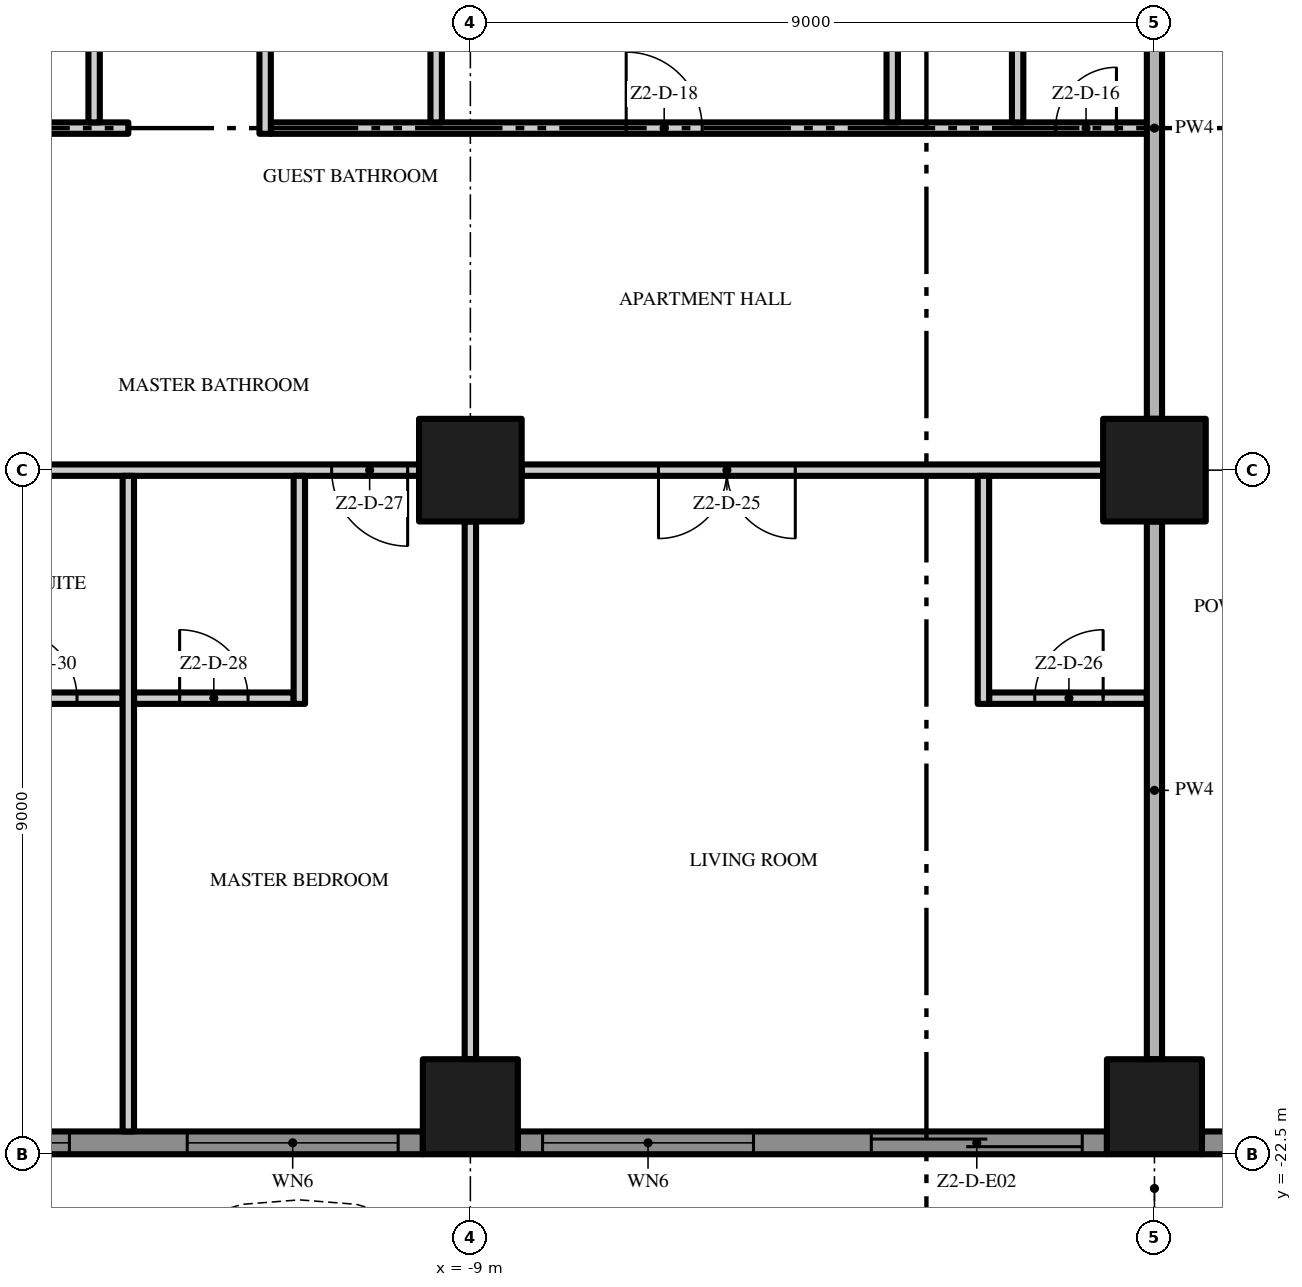
"""IFC4 building model, lengths in metres.
Left out: names, types, materials, properties, quantities, classifications, styles, units other than length and angle.
Written with IfcOpenShell. Run it as: python <this file> out.ifc"""

import sys

from ifc_helpers import new_model, si_unit, direction, frame, frame_2d, origin, origin_2d, place, context, subcontext, project, spatial, polyline, rectangle, outline, extrude, element, fill, save


model = new_model("IFC4")
c1 = context("Model", 3, precision=1e-05, world=origin(), true_north=direction((0.0, 1.0)))
c2 = subcontext(c1, "Body", "Model", "MODEL_VIEW")
j1 = project(units=[si_unit("LENGTHUNIT", "METRE"), si_unit("PLANEANGLEUNIT", "RADIAN")], contexts=[c1])
p1 = place(None, origin())
s1 = spatial("IfcSite", under=j1, at=p1, CompositionType="ELEMENT")
p2 = place(p1, origin())
s2 = spatial("IfcBuilding", under=s1, at=p2, CompositionType="ELEMENT")
p3 = place(p2, frame((0.0, 0.0, 107.4)))
s3 = spatial("IfcBuildingStorey", under=s2, at=p3, CompositionType="ELEMENT", Elevation=107.4)
p4 = place(p3, frame((-9.0, -13.5, 0.0), z_axis=(0.0, 0.0, 1.0), x_axis=(1.0, 0.0, 0.0)))
e1 = element("IfcColumn", 1, at=p4, inside=s3, PredefinedType="COLUMN", context=c2, shape_type="SweptSolid", body=[
    extrude(rectangle(XDim=1.35, YDim=1.35, at=origin_2d()), origin(), (0.0, 0.0, 1.0), 3.5),
])
p5 = place(p3, frame((-9.0, -21.875, 0.0), z_axis=(0.0, 0.0, 1.0), x_axis=(1.0, 0.0, 0.0)))
e2 = element("IfcColumn", 2, at=p5, inside=s3, PredefinedType="COLUMN", context=c2, shape_type="SweptSolid", body=[
    extrude(rectangle(XDim=1.25, YDim=1.25, at=origin_2d()), origin(), (0.0, 0.0, 1.0), 3.5),
])
p6 = place(p3, frame((0.0, -13.5, 0.0), z_axis=(0.0, 0.0, 1.0), x_axis=(1.0, 0.0, 0.0)))
e3 = element("IfcColumn", 3, at=p6, inside=s3, PredefinedType="COLUMN", context=c2, shape_type="SweptSolid", body=[
    extrude(rectangle(XDim=1.35, YDim=1.35, at=origin_2d()), origin(), (0.0, 0.0, 1.0), 3.5),
])
p7 = place(p3, frame((0.0, -21.875, 0.0), z_axis=(0.0, 0.0, 1.0), x_axis=(1.0, 0.0, 0.0)))
e4 = element("IfcColumn", 4, at=p7, inside=s3, PredefinedType="COLUMN", context=c2, shape_type="SweptSolid", body=[
    extrude(rectangle(XDim=1.25, YDim=1.25, at=origin_2d()), origin(), (0.0, 0.0, 1.0), 3.5),
])
p8 = place(p3, frame((-9.625, -22.35, 0.0), z_axis=(0.0, 0.0, 1.0), x_axis=(-1.0, 0.0, 0.0)))
e5 = element("IfcWall", 5, at=p8, inside=s3, PredefinedType="SOLIDWALL", context=c2, shape_type="SweptSolid", body=[
    extrude(rectangle(XDim=7.75, YDim=0.3, at=frame_2d((3.875, 0.0))), origin(), (0.0, 0.0, 1.0), 3.5),
])
p9 = place(p8, frame((4.65, 0.0, 0.45)))
e6 = element("IfcOpeningElement", 6, at=p9, cuts=e5, PredefinedType="OPENING", context=c2, shape_type="SweptSolid", body=[
    extrude(rectangle(XDim=2.775, YDim=2.65, at=frame_2d((1.387, 1.325))), frame((0.0, 0.16, 0.0), z_axis=(0.0, -1.0, 0.0), x_axis=(1.0, 0.0, 0.0)), (0.0, 0.0, 1.0), 0.32),
])
p10 = place(p8, frame((0.325, 0.0, 0.45)))
e7 = element("IfcOpeningElement", 7, at=p10, cuts=e5, PredefinedType="OPENING", context=c2, shape_type="SweptSolid", body=[
    extrude(rectangle(XDim=2.775, YDim=2.65, at=frame_2d((1.387, 1.325))), frame((0.0, 0.16, 0.0), z_axis=(0.0, -1.0, 0.0), x_axis=(1.0, 0.0, 0.0)), (0.0, 0.0, 1.0), 0.32),
])
p11 = place(p3, frame((-0.625, -22.35, 0.0), z_axis=(0.0, 0.0, 1.0), x_axis=(-1.0, 0.0, 0.0)))
e8 = element("IfcWall", 8, at=p11, inside=s3, PredefinedType="SOLIDWALL", context=c2, shape_type="SweptSolid", body=[
    extrude(rectangle(XDim=7.75, YDim=0.3, at=frame_2d((3.875, 0.0))), origin(), (0.0, 0.0, 1.0), 3.5),
])
p12 = place(p11, frame((4.65, 0.0, 0.45)))
e9 = element("IfcOpeningElement", 9, at=p12, cuts=e8, PredefinedType="OPENING", context=c2, shape_type="SweptSolid", body=[
    extrude(rectangle(XDim=2.775, YDim=2.65, at=frame_2d((1.387, 1.325))), frame((0.0, 0.16, 0.0), z_axis=(0.0, -1.0, 0.0), x_axis=(1.0, 0.0, 0.0)), (0.0, 0.0, 1.0), 0.32),
])
p13 = place(p11, frame((0.325, 0.0, 0.0)))
e10 = element("IfcOpeningElement", 10, at=p13, cuts=e8, PredefinedType="OPENING", context=c2, shape_type="SweptSolid", body=[
    extrude(rectangle(XDim=2.775, YDim=2.4, at=frame_2d((1.387, 1.2))), frame((0.0, 0.16, 0.0), z_axis=(0.0, -1.0, 0.0), x_axis=(1.0, 0.0, 0.0)), (0.0, 0.0, 1.0), 0.32),
])
p14 = place(p3, frame((8.375, -22.35, 0.0), z_axis=(0.0, 0.0, 1.0), x_axis=(-1.0, 0.0, 0.0)))
e11 = element("IfcWall", 11, at=p14, inside=s3, PredefinedType="SOLIDWALL", context=c2, shape_type="SweptSolid", body=[
    extrude(rectangle(XDim=7.75, YDim=0.3, at=frame_2d((3.875, 0.0))), origin(), (0.0, 0.0, 1.0), 3.5),
])
p15 = place(p14, frame((4.65, 0.0, 0.45)))
e12 = element("IfcOpeningElement", 12, at=p15, cuts=e11, PredefinedType="OPENING", context=c2, shape_type="SweptSolid", body=[
    extrude(rectangle(XDim=2.775, YDim=2.65, at=frame_2d((1.387, 1.325))), frame((0.0, 0.16, 0.0), z_axis=(0.0, -1.0, 0.0), x_axis=(1.0, 0.0, 0.0)), (0.0, 0.0, 1.0), 0.32),
])
p16 = place(p14, frame((0.325, 0.0, 0.45)))
e13 = element("IfcOpeningElement", 13, at=p16, cuts=e11, PredefinedType="OPENING", context=c2, shape_type="SweptSolid", body=[
    extrude(rectangle(XDim=2.775, YDim=2.65, at=frame_2d((1.387, 1.325))), frame((0.0, 0.16, 0.0), z_axis=(0.0, -1.0, 0.0), x_axis=(1.0, 0.0, 0.0)), (0.0, 0.0, 1.0), 0.32),
])
p17 = place(p3, origin())
e14 = element("IfcWall", 14, at=p17, inside=s3, PredefinedType="USERDEFINED", context=c2, shape_type="SweptSolid", body=[
    extrude(outline(polyline([(-22.5, -24.3), (-21.0, -25.005), (-19.5, -25.441), (-18.75, -25.5), (-18.0, -25.441), (-16.5, -25.005), (-15.0, -24.3), (-13.5, -23.595), (-12.0, -23.159), (-11.25, -23.1), (-10.5, -23.159), (-9.0, -23.595), (-7.5, -24.3), (-6.0, -25.005), (-4.5, -25.441), (-3.75, -25.5), (-3.0, -25.441), (-1.5, -25.005), (0.0, -24.3), (1.5, -23.595), (3.0, -23.159), (3.75, -23.1), (4.5, -23.159), (6.0, -23.595), (7.5, -24.3), (9.0, -25.005), (10.5, -25.441), (11.25, -25.5), (12.0, -25.441), (13.5, -25.005), (15.0, -24.3), (16.5, -23.595), (18.0, -23.159), (18.75, -23.1), (19.5, -23.159), (21.0, -23.595), (22.5, -24.3), (22.606, -24.074), (21.089, -23.36), (19.545, -22.911), (18.75, -22.849), (17.955, -22.911), (16.411, -23.36), (14.894, -24.074), (13.411, -24.771), (11.955, -25.194), (11.25, -25.249), (10.545, -25.194), (9.089, -24.771), (7.606, -24.074), (6.089, -23.36), (4.545, -22.911), (3.75, -22.849), (2.955, -22.911), (1.411, -23.36), (-0.106, -24.074), (-1.589, -24.771), (-3.045, -25.194), (-3.75, -25.249), (-4.455, -25.194), (-5.911, -24.771), (-7.394, -24.074), (-8.911, -23.36), (-10.455, -22.911), (-11.25, -22.849), (-12.045, -22.911), (-13.589, -23.36), (-15.106, -24.074), (-16.589, -24.771), (-18.045, -25.194), (-18.75, -25.249), (-19.455, -25.194), (-20.911, -24.771), (-22.394, -24.074), (-22.5, -24.3)])), origin(), (0.0, 0.0, 1.0), 0.9),
])
p18 = place(p3, frame((-15.675, -16.5, 0.0), z_axis=(0.0, 0.0, 1.0), x_axis=(1.0, 0.0, 0.0)))
e15 = element("IfcWall", 15, at=p18, inside=s3, PredefinedType="PARTITIONING", context=c2, shape_type="SweptSolid", body=[
    extrude(rectangle(XDim=2.1, YDim=0.15, at=frame_2d((1.05, 0.0))), origin(), (0.0, 0.0, 1.0), 3.5),
])
p19 = place(p18, frame((0.6, 0.0, 0.0)))
e16 = element("IfcOpeningElement", 16, at=p19, cuts=e15, PredefinedType="OPENING", context=c2, shape_type="SweptSolid", body=[
    extrude(rectangle(XDim=0.9, YDim=2.1, at=frame_2d((0.45, 1.05))), frame((0.0, 0.085, 0.0), z_axis=(0.0, -1.0, 0.0), x_axis=(1.0, 0.0, 0.0)), (0.0, 0.0, 1.0), 0.17),
])
p20 = place(p3, frame((-13.425, -16.5, 0.0), z_axis=(0.0, 0.0, 1.0), x_axis=(1.0, 0.0, 0.0)))
e17 = element("IfcWall", 17, at=p20, inside=s3, PredefinedType="PARTITIONING", context=c2, shape_type="SweptSolid", body=[
    extrude(rectangle(XDim=2.1, YDim=0.15, at=frame_2d((1.05, 0.0))), origin(), (0.0, 0.0, 1.0), 3.5),
])
p21 = place(p20, frame((0.6, 0.0, 0.0)))
e18 = element("IfcOpeningElement", 18, at=p21, cuts=e17, PredefinedType="OPENING", context=c2, shape_type="SweptSolid", body=[
    extrude(rectangle(XDim=0.9, YDim=2.1, at=frame_2d((0.45, 1.05))), frame((0.0, 0.085, 0.0), z_axis=(0.0, -1.0, 0.0), x_axis=(1.0, 0.0, 0.0)), (0.0, 0.0, 1.0), 0.17),
])
p22 = place(p3, frame((-2.175, -16.5, 0.0), z_axis=(0.0, 0.0, 1.0), x_axis=(1.0, 0.0, 0.0)))
e19 = element("IfcWall", 19, at=p22, inside=s3, PredefinedType="PARTITIONING", context=c2, shape_type="SweptSolid", body=[
    extrude(rectangle(XDim=2.075, YDim=0.15, at=frame_2d((1.038, 0.0))), origin(), (0.0, 0.0, 1.0), 3.5),
])
p23 = place(p22, frame((0.6, 0.0, 0.0)))
e20 = element("IfcOpeningElement", 20, at=p23, cuts=e19, PredefinedType="OPENING", context=c2, shape_type="SweptSolid", body=[
    extrude(rectangle(XDim=0.9, YDim=2.1, at=frame_2d((0.45, 1.05))), frame((0.0, 0.085, 0.0), z_axis=(0.0, -1.0, 0.0), x_axis=(1.0, 0.0, 0.0)), (0.0, 0.0, 1.0), 0.17),
])
p24 = place(p3, frame((-9.675, -13.5, 0.0), z_axis=(0.0, 0.0, 1.0), x_axis=(-1.0, 0.0, 0.0)))
e21 = element("IfcWall", 21, at=p24, inside=s3, PredefinedType="PARTITIONING", context=c2, shape_type="SweptSolid", body=[
    extrude(rectangle(XDim=7.65, YDim=0.15, at=frame_2d((3.825, 0.0))), origin(), (0.0, 0.0, 1.0), 3.5),
])
p25 = place(p24, frame((0.15, 0.0, 0.0)))
e22 = element("IfcOpeningElement", 22, at=p25, cuts=e21, PredefinedType="OPENING", context=c2, shape_type="SweptSolid", body=[
    extrude(rectangle(XDim=1.0, YDim=2.4, at=frame_2d((0.5, 1.2))), frame((0.0, 0.085, 0.0), z_axis=(0.0, -1.0, 0.0), x_axis=(1.0, 0.0, 0.0)), (0.0, 0.0, 1.0), 0.17),
])
p26 = place(p24, frame((6.5, 0.0, 0.0)))
e23 = element("IfcOpeningElement", 23, at=p26, cuts=e21, PredefinedType="OPENING", context=c2, shape_type="SweptSolid", body=[
    extrude(rectangle(XDim=1.0, YDim=2.4, at=frame_2d((0.5, 1.2))), frame((0.0, 0.085, 0.0), z_axis=(0.0, -1.0, 0.0), x_axis=(1.0, 0.0, 0.0)), (0.0, 0.0, 1.0), 0.17),
])
p27 = place(p3, frame((-0.675, -13.5, 0.0), z_axis=(0.0, 0.0, 1.0), x_axis=(-1.0, 0.0, 0.0)))
e24 = element("IfcWall", 24, at=p27, inside=s3, PredefinedType="PARTITIONING", context=c2, shape_type="SweptSolid", body=[
    extrude(rectangle(XDim=7.65, YDim=0.15, at=frame_2d((3.825, 0.0))), origin(), (0.0, 0.0, 1.0), 3.5),
])
p28 = place(p27, frame((4.05, 0.0, 0.0)))
e25 = element("IfcOpeningElement", 25, at=p28, cuts=e24, PredefinedType="OPENING", context=c2, shape_type="SweptSolid", body=[
    extrude(rectangle(XDim=1.8, YDim=2.4, at=frame_2d((0.9, 1.2))), frame((0.0, 0.085, 0.0), z_axis=(0.0, -1.0, 0.0), x_axis=(1.0, 0.0, 0.0)), (0.0, 0.0, 1.0), 0.17),
])
p29 = place(p3, frame((-26.7, -9.0, 0.0), z_axis=(0.0, 0.0, 1.0), x_axis=(1.0, 0.0, 0.0)))
e26 = element("IfcWall", 26, at=p29, inside=s3, PredefinedType="PARTITIONING", context=c2, shape_type="SweptSolid", body=[
    extrude(rectangle(XDim=13.2, YDim=0.15, at=frame_2d((6.6, 0.0))), origin(), (0.0, 0.0, 1.0), 3.5),
])
p30 = place(p29, frame((8.3, 0.0, 0.0)))
e27 = element("IfcOpeningElement", 27, at=p30, cuts=e26, PredefinedType="OPENING", context=c2, shape_type="SweptSolid", body=[
    extrude(rectangle(XDim=0.8, YDim=2.0, at=frame_2d((0.4, 1.0))), frame((0.0, 0.085, 0.0), z_axis=(0.0, -1.0, 0.0), x_axis=(1.0, 0.0, 0.0)), (0.0, 0.0, 1.0), 0.17),
])
p31 = place(p3, frame((-11.625, -9.0, 0.0), z_axis=(0.0, 0.0, 1.0), x_axis=(1.0, 0.0, 0.0)))
e28 = element("IfcWall", 28, at=p31, inside=s3, PredefinedType="PARTITIONING", context=c2, shape_type="SweptSolid", body=[
    extrude(rectangle(XDim=11.525, YDim=0.15, at=frame_2d((5.763, 0.0))), origin(), (0.0, 0.0, 1.0), 3.5),
])
p32 = place(p31, frame((10.325, 0.0, 0.0)))
e29 = element("IfcOpeningElement", 29, at=p32, cuts=e28, PredefinedType="OPENING", context=c2, shape_type="SweptSolid", body=[
    extrude(rectangle(XDim=0.8, YDim=2.0, at=frame_2d((0.4, 1.0))), frame((0.0, 0.085, 0.0), z_axis=(0.0, -1.0, 0.0), x_axis=(1.0, 0.0, 0.0)), (0.0, 0.0, 1.0), 0.17),
])
p33 = place(p31, frame((4.675, 0.0, 0.0)))
e30 = element("IfcOpeningElement", 30, at=p33, cuts=e28, PredefinedType="OPENING", context=c2, shape_type="SweptSolid", body=[
    extrude(rectangle(XDim=1.0, YDim=2.4, at=frame_2d((0.5, 1.2))), frame((0.0, 0.085, 0.0), z_axis=(0.0, -1.0, 0.0), x_axis=(1.0, 0.0, 0.0)), (0.0, 0.0, 1.0), 0.17),
])
p34 = place(p3, frame((-13.95, -8.925, 0.0), z_axis=(0.0, 0.0, 1.0), x_axis=(0.0, 1.0, 0.0)))
e31 = element("IfcWall", 31, at=p34, inside=s3, PredefinedType="PARTITIONING", context=c2, shape_type="SweptSolid", body=[
    extrude(rectangle(XDim=4.5, YDim=0.15, at=frame_2d((2.25, 0.0))), origin(), (0.0, 0.0, 1.0), 3.5),
])
p35 = place(p3, frame((-13.5, -22.2, 0.0), z_axis=(0.0, 0.0, 1.0), x_axis=(0.0, 1.0, 0.0)))
e32 = element("IfcWall", 32, at=p35, inside=s3, PredefinedType="PARTITIONING", context=c2, shape_type="SweptSolid", body=[
    extrude(rectangle(XDim=8.625, YDim=0.15, at=frame_2d((4.312, 0.0))), origin(), (0.0, 0.0, 1.0), 3.5),
])
p36 = place(p3, frame((-11.7, -4.425, 0.0), z_axis=(0.0, 0.0, 1.0), x_axis=(0.0, -1.0, 0.0)))
e33 = element("IfcWall", 33, at=p36, inside=s3, PredefinedType="PARTITIONING", context=c2, shape_type="SweptSolid", body=[
    extrude(rectangle(XDim=4.65, YDim=0.15, at=frame_2d((2.325, 0.0))), origin(), (0.0, 0.0, 1.0), 3.5),
])
p37 = place(p36, frame((1.875, 0.0, 0.0)))
e34 = element("IfcOpeningElement", 34, at=p37, cuts=e33, PredefinedType="OPENING", context=c2, shape_type="SweptSolid", body=[
    extrude(rectangle(XDim=0.9, YDim=2.1, at=frame_2d((0.45, 1.05))), frame((0.0, 0.085, 0.0), z_axis=(0.0, -1.0, 0.0), x_axis=(1.0, 0.0, 0.0)), (0.0, 0.0, 1.0), 0.17),
])
p38 = place(p3, frame((-11.25, -16.575, 0.0), z_axis=(0.0, 0.0, 1.0), x_axis=(0.0, 1.0, 0.0)))
e35 = element("IfcWall", 35, at=p38, inside=s3, PredefinedType="PARTITIONING", context=c2, shape_type="SweptSolid", body=[
    extrude(rectangle(XDim=3.0, YDim=0.15, at=frame_2d((1.5, 0.0))), origin(), (0.0, 0.0, 1.0), 3.5),
])
p39 = place(p3, frame((-9.45, -8.925, 0.0), z_axis=(0.0, 0.0, 1.0), x_axis=(0.0, 1.0, 0.0)))
e36 = element("IfcWall", 36, at=p39, inside=s3, PredefinedType="PARTITIONING", context=c2, shape_type="SweptSolid", body=[
    extrude(rectangle(XDim=3.75, YDim=0.15, at=frame_2d((1.875, 0.0))), origin(), (0.0, 0.0, 1.0), 3.5),
])
p40 = place(p3, frame((-9.0, -21.25, 0.0), z_axis=(0.0, 0.0, 1.0), x_axis=(0.0, 1.0, 0.0)))
e37 = element("IfcWall", 37, at=p40, inside=s3, PredefinedType="PARTITIONING", context=c2, shape_type="SweptSolid", body=[
    extrude(rectangle(XDim=7.075, YDim=0.15, at=frame_2d((3.538, 0.0))), origin(), (0.0, 0.0, 1.0), 3.5),
])
p41 = place(p3, frame((-3.45, -8.925, 0.0), z_axis=(0.0, 0.0, 1.0), x_axis=(0.0, 1.0, 0.0)))
e38 = element("IfcWall", 38, at=p41, inside=s3, PredefinedType="PARTITIONING", context=c2, shape_type="SweptSolid", body=[
    extrude(rectangle(XDim=4.35, YDim=0.15, at=frame_2d((2.175, 0.0))), origin(), (0.0, 0.0, 1.0), 3.5),
])
p42 = place(p3, frame((-2.25, -16.575, 0.0), z_axis=(0.0, 0.0, 1.0), x_axis=(0.0, 1.0, 0.0)))
e39 = element("IfcWall", 39, at=p42, inside=s3, PredefinedType="PARTITIONING", context=c2, shape_type="SweptSolid", body=[
    extrude(rectangle(XDim=3.0, YDim=0.15, at=frame_2d((1.5, 0.0))), origin(), (0.0, 0.0, 1.0), 3.5),
])
p43 = place(p3, frame((-1.8, -8.925, 0.0), z_axis=(0.0, 0.0, 1.0), x_axis=(0.0, 1.0, 0.0)))
e40 = element("IfcWall", 40, at=p43, inside=s3, PredefinedType="PARTITIONING", context=c2, shape_type="SweptSolid", body=[
    extrude(rectangle(XDim=4.35, YDim=0.15, at=frame_2d((2.175, 0.0))), origin(), (0.0, 0.0, 1.0), 3.5),
])
p44 = place(p3, frame((0.0, -21.25, 0.0), z_axis=(0.0, 0.0, 1.0), x_axis=(0.0, 1.0, 0.0)))
e41 = element("IfcWall", 41, at=p44, inside=s3, PredefinedType="PARTITIONING", context=c2, shape_type="SweptSolid", body=[
    extrude(rectangle(XDim=7.075, YDim=0.2, at=frame_2d((3.538, 0.0))), origin(), (0.0, 0.0, 1.0), 3.5),
])
p45 = place(p3, frame((0.0, -12.825, 0.0), z_axis=(0.0, 0.0, 1.0), x_axis=(0.0, 1.0, 0.0)))
e42 = element("IfcWall", 42, at=p45, inside=s3, PredefinedType="PARTITIONING", context=c2, shape_type="SweptSolid", body=[
    extrude(rectangle(XDim=7.65, YDim=0.2, at=frame_2d((3.825, 0.0))), origin(), (0.0, 0.0, 1.0), 3.5),
])
p46 = place(p9, origin())
e43 = element("IfcWindow", 43, at=p46, inside=s3, PartitioningType="SINGLE_PANEL", PredefinedType="WINDOW", context=c2, shape_type="SweptSolid", body=[
    extrude(rectangle(XDim=2.775, YDim=2.65, at=frame_2d((1.387, 1.325))), frame((0.0, 0.03, 0.0), z_axis=(0.0, -1.0, 0.0), x_axis=(1.0, 0.0, 0.0)), (0.0, 0.0, 1.0), 0.06),
])
fill(e6, e43)
p47 = place(p10, origin())
e44 = element("IfcWindow", 44, at=p47, inside=s3, PartitioningType="SINGLE_PANEL", PredefinedType="WINDOW", context=c2, shape_type="SweptSolid", body=[
    extrude(rectangle(XDim=2.775, YDim=2.65, at=frame_2d((1.387, 1.325))), frame((0.0, 0.03, 0.0), z_axis=(0.0, -1.0, 0.0), x_axis=(1.0, 0.0, 0.0)), (0.0, 0.0, 1.0), 0.06),
])
fill(e7, e44)
p48 = place(p12, origin())
e45 = element("IfcWindow", 45, at=p48, inside=s3, PartitioningType="SINGLE_PANEL", PredefinedType="WINDOW", context=c2, shape_type="SweptSolid", body=[
    extrude(rectangle(XDim=2.775, YDim=2.65, at=frame_2d((1.387, 1.325))), frame((0.0, 0.03, 0.0), z_axis=(0.0, -1.0, 0.0), x_axis=(1.0, 0.0, 0.0)), (0.0, 0.0, 1.0), 0.06),
])
fill(e9, e45)
p49 = place(p13, origin())
e46 = element("IfcDoor", 46, at=p49, inside=s3, OperationType="SINGLE_SWING_LEFT", PredefinedType="DOOR", context=c2, shape_type="SweptSolid", body=[
    extrude(rectangle(XDim=2.775, YDim=2.4, at=frame_2d((1.387, 1.2))), frame((0.0, 0.025, 0.0), z_axis=(0.0, -1.0, 0.0), x_axis=(1.0, 0.0, 0.0)), (0.0, 0.0, 1.0), 0.05),
])
fill(e10, e46)
p50 = place(p32, origin())
e47 = element("IfcDoor", 47, at=p50, inside=s3, OperationType="SINGLE_SWING_RIGHT", PredefinedType="DOOR", context=c2, shape_type="SweptSolid", body=[
    extrude(rectangle(XDim=0.8, YDim=2.0, at=frame_2d((0.4, 1.0))), frame((0.0, 0.025, 0.0), z_axis=(0.0, -1.0, 0.0), x_axis=(1.0, 0.0, 0.0)), (0.0, 0.0, 1.0), 0.05),
])
fill(e29, e47)
p51 = place(p33, origin())
e48 = element("IfcDoor", 48, at=p51, inside=s3, OperationType="SINGLE_SWING_LEFT", PredefinedType="DOOR", context=c2, shape_type="SweptSolid", body=[
    extrude(rectangle(XDim=1.0, YDim=2.4, at=frame_2d((0.5, 1.2))), frame((0.0, 0.025, 0.0), z_axis=(0.0, -1.0, 0.0), x_axis=(1.0, 0.0, 0.0)), (0.0, 0.0, 1.0), 0.05),
])
fill(e30, e48)
p52 = place(p28, origin())
e49 = element("IfcDoor", 49, at=p52, inside=s3, OperationType="DOUBLE_DOOR_SINGLE_SWING", PredefinedType="DOOR", context=c2, shape_type="SweptSolid", body=[
    extrude(rectangle(XDim=1.8, YDim=2.4, at=frame_2d((0.9, 1.2))), frame((0.0, 0.025, 0.0), z_axis=(0.0, -1.0, 0.0), x_axis=(1.0, 0.0, 0.0)), (0.0, 0.0, 1.0), 0.05),
])
fill(e25, e49)
p53 = place(p23, origin())
e50 = element("IfcDoor", 50, at=p53, inside=s3, OperationType="SINGLE_SWING_RIGHT", PredefinedType="DOOR", context=c2, shape_type="SweptSolid", body=[
    extrude(rectangle(XDim=0.9, YDim=2.1, at=frame_2d((0.45, 1.05))), frame((0.0, 0.025, 0.0), z_axis=(0.0, -1.0, 0.0), x_axis=(1.0, 0.0, 0.0)), (0.0, 0.0, 1.0), 0.05),
])
fill(e20, e50)
p54 = place(p25, origin())
e51 = element("IfcDoor", 51, at=p54, inside=s3, OperationType="SINGLE_SWING_LEFT", PredefinedType="DOOR", context=c2, shape_type="SweptSolid", body=[
    extrude(rectangle(XDim=1.0, YDim=2.4, at=frame_2d((0.5, 1.2))), frame((0.0, 0.025, 0.0), z_axis=(0.0, -1.0, 0.0), x_axis=(1.0, 0.0, 0.0)), (0.0, 0.0, 1.0), 0.05),
])
fill(e22, e51)
p55 = place(p21, origin())
e52 = element("IfcDoor", 52, at=p55, inside=s3, OperationType="SINGLE_SWING_LEFT", PredefinedType="DOOR", context=c2, shape_type="SweptSolid", body=[
    extrude(rectangle(XDim=0.9, YDim=2.1, at=frame_2d((0.45, 1.05))), frame((0.0, 0.025, 0.0), z_axis=(0.0, -1.0, 0.0), x_axis=(1.0, 0.0, 0.0)), (0.0, 0.0, 1.0), 0.05),
])
fill(e18, e52)
p56 = place(p19, origin())
e53 = element("IfcDoor", 53, at=p56, inside=s3, OperationType="SINGLE_SWING_LEFT", PredefinedType="DOOR", context=c2, shape_type="SweptSolid", body=[
    extrude(rectangle(XDim=0.9, YDim=2.1, at=frame_2d((0.45, 1.05))), frame((0.0, 0.025, 0.0), z_axis=(0.0, -1.0, 0.0), x_axis=(1.0, 0.0, 0.0)), (0.0, 0.0, 1.0), 0.05),
])
fill(e16, e53)
save(model, sys.argv[1])
